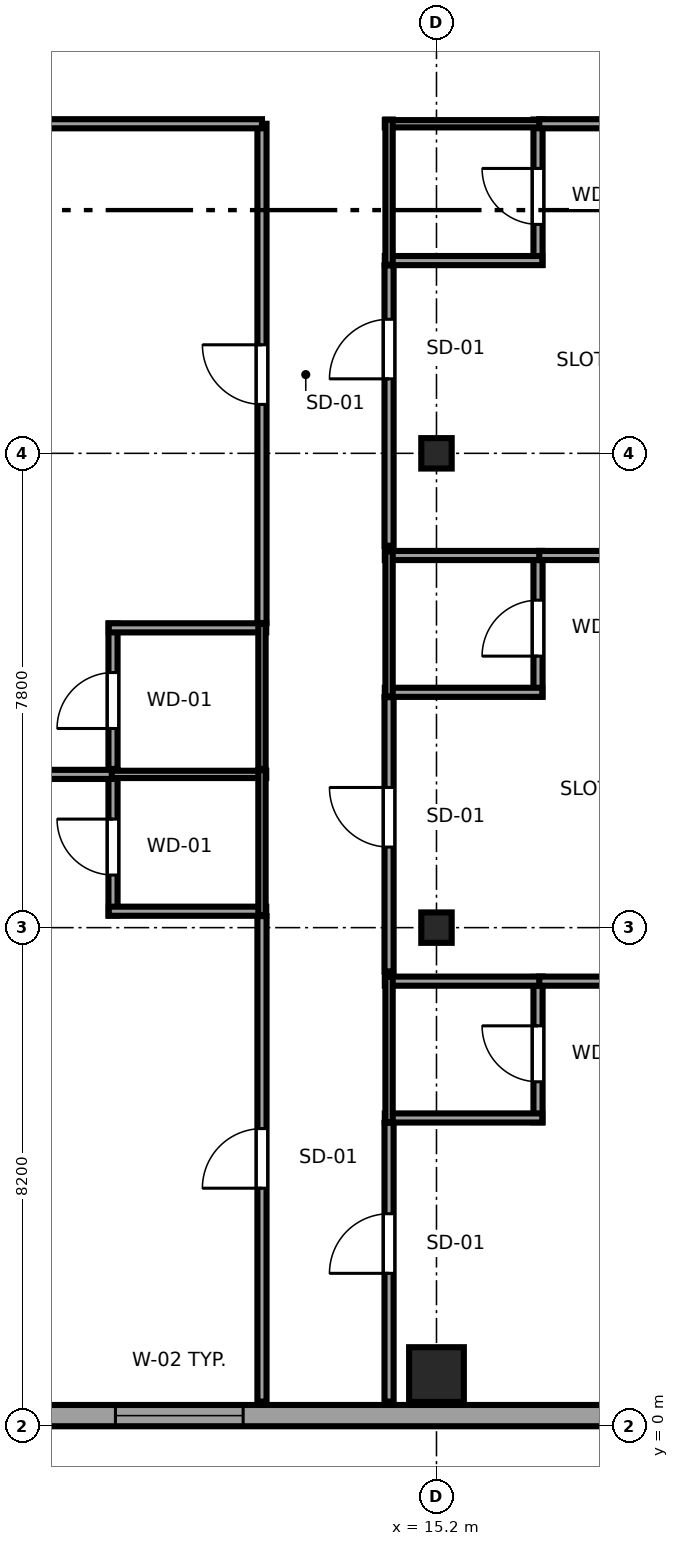
"""IFC4 building model, lengths in metres.
Left out: names, types, materials, properties, quantities, classifications, styles, units other than length and angle.
Written with IfcOpenShell. Run it as: python <this file> out.ifc"""

import sys

from ifc_helpers import new_model, si_unit, direction, frame, frame_2d, origin, origin_2d, place, context, subcontext, project, spatial, rectangle, i_section, extrude, source, transform, mapped, element, fill, save


model = new_model("IFC4")
c1 = context("Model", 3, precision=1e-05, world=origin(), true_north=direction((0.0, 1.0)))
c2 = subcontext(c1, "Body", "Model", "MODEL_VIEW")
j1 = project(units=[si_unit("LENGTHUNIT", "METRE"), si_unit("PLANEANGLEUNIT", "RADIAN")], contexts=[c1])
p1 = place(None, origin())
s1 = spatial("IfcSite", under=j1, at=p1, CompositionType="ELEMENT")
p2 = place(p1, origin())
s2 = spatial("IfcBuilding", under=s1, at=p2, CompositionType="ELEMENT")
p3 = place(p2, frame((0.0, 0.0, 139.95)))
s3 = spatial("IfcBuildingStorey", under=s2, at=p3, CompositionType="ELEMENT", Elevation=139.95)
m1 = source(origin(), c2, "Body", "SweptSolid", [
    extrude(rectangle(XDim=0.9, YDim=0.9, at=origin_2d()), origin(), (0.0, 0.0, 1.0), 3.55),
])
p4 = place(p3, frame((15.2, 0.85, 0.0), z_axis=(0.0, 0.0, 1.0), x_axis=(1.0, 0.0, 0.0)))
e1 = element("IfcColumn", 1, at=p4, inside=s3, PredefinedType="COLUMN", context=c2, shape_type="MappedRepresentation", body=[
    mapped(m1, transform((0.0, 0.0, 0.0), x_axis=(1.0, 0.0, 0.0), y_axis=(0.0, 1.0, 0.0), z_axis=(0.0, 0.0, 1.0), scale=1.0)),
])
m2 = source(origin(), c2, "Body", "SweptSolid", [
    extrude(i_section(OverallWidth=0.5, OverallDepth=0.5, WebThickness=0.022, FlangeThickness=0.034, at=origin_2d()), origin(), (0.0, 0.0, 1.0), 3.55),
])
for number, where, z_axis, x_axis in (
    (2, (15.2, 8.2, 0.0), (0.0, 0.0, 1.0), (1.0, 0.0, 0.0)),
    (3, (15.2, 16.0, 0.0), (0.0, 0.0, 1.0), (1.0, 0.0, 0.0)),
):
    element("IfcColumn", number, at=place(p3, frame(where, z_axis=z_axis, x_axis=x_axis)), inside=s3, PredefinedType="COLUMN", context=c2, shape_type="MappedRepresentation", body=[
        mapped(m2, transform((0.0, 0.0, 0.0), x_axis=(1.0, 0.0, 0.0), y_axis=(0.0, 1.0, 0.0), z_axis=(0.0, 0.0, 1.0), scale=1.0)),
    ])
p5 = place(p3, frame((4.617, 0.175, 0.0), z_axis=(0.0, 0.0, 1.0), x_axis=(1.0, 0.0, 0.0)))
e4 = element("IfcWall", 4, at=p5, inside=s3, PredefinedType="SOLIDWALL", context=c2, shape_type="SweptSolid", body=[
    extrude(rectangle(XDim=18.008, YDim=0.35, at=frame_2d((9.004, 0.0))), origin(), (0.0, 0.0, 1.0), 3.37),
])
p6 = place(p5, frame((5.303, 0.0, 0.68)))
e5 = element("IfcOpeningElement", 5, at=p6, cuts=e4, PredefinedType="OPENING", context=c2, shape_type="SweptSolid", body=[
    extrude(rectangle(XDim=2.1, YDim=1.9, at=frame_2d((1.05, 0.95))), frame((0.0, 0.185, 0.0), z_axis=(0.0, -1.0, 0.0), x_axis=(1.0, 0.0, 0.0)), (0.0, 0.0, 1.0), 0.37),
])
p7 = place(p5, frame((14.257, 0.0, 0.68)))
e6 = element("IfcOpeningElement", 6, at=p7, cuts=e4, PredefinedType="OPENING", context=c2, shape_type="SweptSolid", body=[
    extrude(rectangle(XDim=2.1, YDim=1.9, at=frame_2d((1.05, 0.95))), frame((0.0, 0.185, 0.0), z_axis=(0.0, -1.0, 0.0), x_axis=(1.0, 0.0, 0.0)), (0.0, 0.0, 1.0), 0.37),
])
p8 = place(p3, frame((9.88, 8.4, 0.0), z_axis=(0.0, 0.0, 1.0), x_axis=(0.0, 1.0, 0.0)))
e7 = element("IfcWall", 7, at=p8, inside=s3, PredefinedType="PARTITIONING", context=c2, shape_type="SweptSolid", body=[
    extrude(rectangle(XDim=2.39, YDim=0.15, at=frame_2d((1.195, 0.0))), origin(), (0.0, 0.0, 1.0), 3.37),
])
p9 = place(p8, frame((0.665, 0.0, 0.0)))
e8 = element("IfcOpeningElement", 8, at=p9, cuts=e7, PredefinedType="OPENING", context=c2, shape_type="SweptSolid", body=[
    extrude(rectangle(XDim=0.92, YDim=2.01, at=frame_2d((0.46, 1.005))), frame((0.0, 0.085, 0.0), z_axis=(0.0, -1.0, 0.0), x_axis=(1.0, 0.0, 0.0)), (0.0, 0.0, 1.0), 0.17),
])
p10 = place(p3, frame((9.81, 8.47, 0.0), z_axis=(0.0, 0.0, 1.0), x_axis=(1.0, 0.0, 0.0)))
e9 = element("IfcWall", 9, at=p10, inside=s3, PredefinedType="PARTITIONING", context=c2, shape_type="SweptSolid", body=[
    extrude(rectangle(XDim=2.59, YDim=0.15, at=frame_2d((1.295, 0.0))), origin(), (0.0, 0.0, 1.0), 3.37),
])
p11 = place(p3, frame((9.81, 10.72, 0.0), z_axis=(0.0, 0.0, 1.0), x_axis=(1.0, 0.0, 0.0)))
e10 = element("IfcWall", 10, at=p11, inside=s3, PredefinedType="PLUMBINGWALL", context=c2, shape_type="SweptSolid", body=[
    extrude(rectangle(XDim=2.59, YDim=0.12, at=frame_2d((1.295, 0.0))), origin(), (0.0, 0.0, 1.0), 3.37),
])
p12 = place(p3, frame((12.33, 8.4, 0.0), z_axis=(0.0, 0.0, 1.0), x_axis=(0.0, 1.0, 0.0)))
e11 = element("IfcWall", 11, at=p12, inside=s3, PredefinedType="PLUMBINGWALL", context=c2, shape_type="SweptSolid", body=[
    extrude(rectangle(XDim=2.39, YDim=0.12, at=frame_2d((1.195, 0.0))), origin(), (0.0, 0.0, 1.0), 3.37),
])
p13 = place(p3, frame((9.88, 10.81, 0.0), z_axis=(0.0, 0.0, 1.0), x_axis=(0.0, 1.0, 0.0)))
e12 = element("IfcWall", 12, at=p13, inside=s3, PredefinedType="PARTITIONING", context=c2, shape_type="SweptSolid", body=[
    extrude(rectangle(XDim=2.39, YDim=0.15, at=frame_2d((1.195, 0.0))), origin(), (0.0, 0.0, 1.0), 3.37),
])
p14 = place(p13, frame((0.665, 0.0, 0.0)))
e13 = element("IfcOpeningElement", 13, at=p14, cuts=e12, PredefinedType="OPENING", context=c2, shape_type="SweptSolid", body=[
    extrude(rectangle(XDim=0.92, YDim=2.01, at=frame_2d((0.46, 1.005))), frame((0.0, 0.085, 0.0), z_axis=(0.0, -1.0, 0.0), x_axis=(1.0, 0.0, 0.0)), (0.0, 0.0, 1.0), 0.17),
])
p15 = place(p3, frame((9.81, 13.13, 0.0), z_axis=(0.0, 0.0, 1.0), x_axis=(1.0, 0.0, 0.0)))
e14 = element("IfcWall", 14, at=p15, inside=s3, PredefinedType="PARTITIONING", context=c2, shape_type="SweptSolid", body=[
    extrude(rectangle(XDim=2.59, YDim=0.15, at=frame_2d((1.295, 0.0))), origin(), (0.0, 0.0, 1.0), 3.37),
])
p16 = place(p3, frame((12.33, 10.81, 0.0), z_axis=(0.0, 0.0, 1.0), x_axis=(0.0, 1.0, 0.0)))
e15 = element("IfcWall", 15, at=p16, inside=s3, PredefinedType="PLUMBINGWALL", context=c2, shape_type="SweptSolid", body=[
    extrude(rectangle(XDim=2.39, YDim=0.12, at=frame_2d((1.195, 0.0))), origin(), (0.0, 0.0, 1.0), 3.37),
])
p17 = place(p3, frame((16.87, 5.0, 0.0), z_axis=(0.0, 0.0, 1.0), x_axis=(0.0, 1.0, 0.0)))
e16 = element("IfcWall", 16, at=p17, inside=s3, PredefinedType="PARTITIONING", context=c2, shape_type="SweptSolid", body=[
    extrude(rectangle(XDim=2.39, YDim=0.15, at=frame_2d((1.195, 0.0))), origin(), (0.0, 0.0, 1.0), 3.37),
])
p18 = place(p17, frame((0.665, 0.0, 0.0)))
e17 = element("IfcOpeningElement", 17, at=p18, cuts=e16, PredefinedType="OPENING", context=c2, shape_type="SweptSolid", body=[
    extrude(rectangle(XDim=0.92, YDim=2.01, at=frame_2d((0.46, 1.005))), frame((0.0, 0.085, 0.0), z_axis=(0.0, -1.0, 0.0), x_axis=(1.0, 0.0, 0.0)), (0.0, 0.0, 1.0), 0.17),
])
for number, where, z_axis, x_axis in (
    (18, (14.35, 5.07, 0.0), (0.0, 0.0, 1.0), (1.0, 0.0, 0.0)),
    (19, (14.35, 7.32, 0.0), (0.0, 0.0, 1.0), (1.0, 0.0, 0.0)),
):
    element("IfcWall", number, at=place(p3, frame(where, z_axis=z_axis, x_axis=x_axis)), inside=s3, PredefinedType="PARTITIONING", context=c2, shape_type="SweptSolid", body=[
        extrude(rectangle(XDim=2.59, YDim=0.15, at=frame_2d((1.295, 0.0))), origin(), (0.0, 0.0, 1.0), 3.37),
    ])
p19 = place(p3, frame((14.42, 5.0, 0.0), z_axis=(0.0, 0.0, 1.0), x_axis=(0.0, 1.0, 0.0)))
e20 = element("IfcWall", 20, at=p19, inside=s3, PredefinedType="PLUMBINGWALL", context=c2, shape_type="SweptSolid", body=[
    extrude(rectangle(XDim=2.39, YDim=0.12, at=frame_2d((1.195, 0.0))), origin(), (0.0, 0.0, 1.0), 3.37),
])
p20 = place(p3, frame((16.87, 12.0, 0.0), z_axis=(0.0, 0.0, 1.0), x_axis=(0.0, 1.0, 0.0)))
e21 = element("IfcWall", 21, at=p20, inside=s3, PredefinedType="PARTITIONING", context=c2, shape_type="SweptSolid", body=[
    extrude(rectangle(XDim=2.39, YDim=0.15, at=frame_2d((1.195, 0.0))), origin(), (0.0, 0.0, 1.0), 3.37),
])
p21 = place(p20, frame((0.665, 0.0, 0.0)))
e22 = element("IfcOpeningElement", 22, at=p21, cuts=e21, PredefinedType="OPENING", context=c2, shape_type="SweptSolid", body=[
    extrude(rectangle(XDim=0.92, YDim=2.01, at=frame_2d((0.46, 1.005))), frame((0.0, 0.085, 0.0), z_axis=(0.0, -1.0, 0.0), x_axis=(1.0, 0.0, 0.0)), (0.0, 0.0, 1.0), 0.17),
])
for number, where, z_axis, x_axis in (
    (23, (14.35, 12.07, 0.0), (0.0, 0.0, 1.0), (1.0, 0.0, 0.0)),
    (24, (14.35, 14.32, 0.0), (0.0, 0.0, 1.0), (1.0, 0.0, 0.0)),
):
    element("IfcWall", number, at=place(p3, frame(where, z_axis=z_axis, x_axis=x_axis)), inside=s3, PredefinedType="PARTITIONING", context=c2, shape_type="SweptSolid", body=[
        extrude(rectangle(XDim=2.59, YDim=0.15, at=frame_2d((1.295, 0.0))), origin(), (0.0, 0.0, 1.0), 3.37),
    ])
p22 = place(p3, frame((14.42, 12.0, 0.0), z_axis=(0.0, 0.0, 1.0), x_axis=(0.0, 1.0, 0.0)))
e25 = element("IfcWall", 25, at=p22, inside=s3, PredefinedType="PLUMBINGWALL", context=c2, shape_type="SweptSolid", body=[
    extrude(rectangle(XDim=2.39, YDim=0.12, at=frame_2d((1.195, 0.0))), origin(), (0.0, 0.0, 1.0), 3.37),
])
p23 = place(p3, frame((16.87, 19.1, 0.0), z_axis=(0.0, 0.0, 1.0), x_axis=(0.0, 1.0, 0.0)))
e26 = element("IfcWall", 26, at=p23, inside=s3, PredefinedType="PARTITIONING", context=c2, shape_type="SweptSolid", body=[
    extrude(rectangle(XDim=2.39, YDim=0.15, at=frame_2d((1.195, 0.0))), origin(), (0.0, 0.0, 1.0), 3.37),
])
p24 = place(p23, frame((0.665, 0.0, 0.0)))
e27 = element("IfcOpeningElement", 27, at=p24, cuts=e26, PredefinedType="OPENING", context=c2, shape_type="SweptSolid", body=[
    extrude(rectangle(XDim=0.92, YDim=2.01, at=frame_2d((0.46, 1.005))), frame((0.0, 0.085, 0.0), z_axis=(0.0, -1.0, 0.0), x_axis=(1.0, 0.0, 0.0)), (0.0, 0.0, 1.0), 0.17),
])
p25 = place(p3, frame((14.35, 19.17, 0.0), z_axis=(0.0, 0.0, 1.0), x_axis=(1.0, 0.0, 0.0)))
e28 = element("IfcWall", 28, at=p25, inside=s3, PredefinedType="PARTITIONING", context=c2, shape_type="SweptSolid", body=[
    extrude(rectangle(XDim=2.59, YDim=0.15, at=frame_2d((1.295, 0.0))), origin(), (0.0, 0.0, 1.0), 3.37),
])
p26 = place(p3, frame((14.35, 21.42, 0.0), z_axis=(0.0, 0.0, 1.0), x_axis=(1.0, 0.0, 0.0)))
e29 = element("IfcWall", 29, at=p26, inside=s3, PredefinedType="PLUMBINGWALL", context=c2, shape_type="SweptSolid", body=[
    extrude(rectangle(XDim=2.59, YDim=0.12, at=frame_2d((1.295, 0.0))), origin(), (0.0, 0.0, 1.0), 3.37),
])
p27 = place(p3, frame((14.42, 19.1, 0.0), z_axis=(0.0, 0.0, 1.0), x_axis=(0.0, 1.0, 0.0)))
e30 = element("IfcWall", 30, at=p27, inside=s3, PredefinedType="PLUMBINGWALL", context=c2, shape_type="SweptSolid", body=[
    extrude(rectangle(XDim=2.39, YDim=0.12, at=frame_2d((1.195, 0.0))), origin(), (0.0, 0.0, 1.0), 3.37),
])
p28 = place(p3, frame((12.33, 0.405, 0.0), z_axis=(0.0, 0.0, 1.0), x_axis=(0.0, 1.0, 0.0)))
e31 = element("IfcWall", 31, at=p28, inside=s3, PredefinedType="PARTITIONING", context=c2, shape_type="SweptSolid", body=[
    extrude(rectangle(XDim=7.985, YDim=0.15, at=frame_2d((3.992, 0.0))), origin(), (0.0, 0.0, 1.0), 3.37),
])
p29 = place(p28, frame((3.51, 0.0, 0.0)))
e32 = element("IfcOpeningElement", 32, at=p29, cuts=e31, PredefinedType="OPENING", context=c2, shape_type="SweptSolid", body=[
    extrude(rectangle(XDim=0.98, YDim=2.12, at=frame_2d((0.49, 1.06))), frame((0.0, 0.085, 0.0), z_axis=(0.0, -1.0, 0.0), x_axis=(1.0, 0.0, 0.0)), (0.0, 0.0, 1.0), 0.17),
])
p30 = place(p3, frame((0.405, 10.72, 0.0), z_axis=(0.0, 0.0, 1.0), x_axis=(1.0, 0.0, 0.0)))
e33 = element("IfcWall", 33, at=p30, inside=s3, PredefinedType="PARTITIONING", context=c2, shape_type="SweptSolid", body=[
    extrude(rectangle(XDim=9.455, YDim=0.15, at=frame_2d((4.728, 0.0))), origin(), (0.0, 0.0, 1.0), 3.37),
])
p31 = place(p3, frame((12.33, 13.21, 0.0), z_axis=(0.0, 0.0, 1.0), x_axis=(0.0, 1.0, 0.0)))
e34 = element("IfcWall", 34, at=p31, inside=s3, PredefinedType="PARTITIONING", context=c2, shape_type="SweptSolid", body=[
    extrude(rectangle(XDim=8.21, YDim=0.15, at=frame_2d((4.105, 0.0))), origin(), (0.0, 0.0, 1.0), 3.37),
])
p32 = place(p31, frame((3.595, 0.0, 0.0)))
e35 = element("IfcOpeningElement", 35, at=p32, cuts=e34, PredefinedType="OPENING", context=c2, shape_type="SweptSolid", body=[
    extrude(rectangle(XDim=0.98, YDim=2.12, at=frame_2d((0.49, 1.06))), frame((0.0, 0.085, 0.0), z_axis=(0.0, -1.0, 0.0), x_axis=(1.0, 0.0, 0.0)), (0.0, 0.0, 1.0), 0.17),
])
p33 = place(p3, frame((0.405, 21.42, 0.0), z_axis=(0.0, 0.0, 1.0), x_axis=(1.0, 0.0, 0.0)))
e36 = element("IfcWall", 36, at=p33, inside=s3, PredefinedType="PARTITIONING", context=c2, shape_type="SweptSolid", body=[
    extrude(rectangle(XDim=11.925, YDim=0.15, at=frame_2d((5.962, 0.0))), origin(), (0.0, 0.0, 1.0), 3.37),
])
p34 = place(p3, frame((14.42, 0.405, 0.0), z_axis=(0.0, 0.0, 1.0), x_axis=(0.0, 1.0, 0.0)))
e37 = element("IfcWall", 37, at=p34, inside=s3, PredefinedType="PARTITIONING", context=c2, shape_type="SweptSolid", body=[
    extrude(rectangle(XDim=4.585, YDim=0.15, at=frame_2d((2.292, 0.0))), origin(), (0.0, 0.0, 1.0), 3.37),
])
p35 = place(p34, frame((2.11, 0.0, 0.0)))
e38 = element("IfcOpeningElement", 38, at=p35, cuts=e37, PredefinedType="OPENING", context=c2, shape_type="SweptSolid", body=[
    extrude(rectangle(XDim=0.98, YDim=2.12, at=frame_2d((0.49, 1.06))), frame((0.0, 0.085, 0.0), z_axis=(0.0, -1.0, 0.0), x_axis=(1.0, 0.0, 0.0)), (0.0, 0.0, 1.0), 0.17),
])
p36 = place(p3, frame((16.89, 7.32, 0.0), z_axis=(0.0, 0.0, 1.0), x_axis=(1.0, 0.0, 0.0)))
e39 = element("IfcWall", 39, at=p36, inside=s3, PredefinedType="PARTITIONING", context=c2, shape_type="SweptSolid", body=[
    extrude(rectangle(XDim=5.46, YDim=0.15, at=frame_2d((2.73, 0.0))), origin(), (0.0, 0.0, 1.0), 3.37),
])
p37 = place(p3, frame((14.42, 7.48, 0.0), z_axis=(0.0, 0.0, 1.0), x_axis=(0.0, 1.0, 0.0)))
e40 = element("IfcWall", 40, at=p37, inside=s3, PredefinedType="PARTITIONING", context=c2, shape_type="SweptSolid", body=[
    extrude(rectangle(XDim=4.51, YDim=0.15, at=frame_2d((2.255, 0.0))), origin(), (0.0, 0.0, 1.0), 3.37),
])
p38 = place(p37, frame((2.045, 0.0, 0.0)))
e41 = element("IfcOpeningElement", 41, at=p38, cuts=e40, PredefinedType="OPENING", context=c2, shape_type="SweptSolid", body=[
    extrude(rectangle(XDim=0.98, YDim=2.12, at=frame_2d((0.49, 1.06))), frame((0.0, 0.085, 0.0), z_axis=(0.0, -1.0, 0.0), x_axis=(1.0, 0.0, 0.0)), (0.0, 0.0, 1.0), 0.17),
])
p39 = place(p3, frame((16.89, 14.32, 0.0), z_axis=(0.0, 0.0, 1.0), x_axis=(1.0, 0.0, 0.0)))
e42 = element("IfcWall", 42, at=p39, inside=s3, PredefinedType="PARTITIONING", context=c2, shape_type="SweptSolid", body=[
    extrude(rectangle(XDim=5.46, YDim=0.15, at=frame_2d((2.73, 0.0))), origin(), (0.0, 0.0, 1.0), 3.37),
])
p40 = place(p3, frame((14.42, 14.48, 0.0), z_axis=(0.0, 0.0, 1.0), x_axis=(0.0, 1.0, 0.0)))
e43 = element("IfcWall", 43, at=p40, inside=s3, PredefinedType="PARTITIONING", context=c2, shape_type="SweptSolid", body=[
    extrude(rectangle(XDim=4.61, YDim=0.15, at=frame_2d((2.305, 0.0))), origin(), (0.0, 0.0, 1.0), 3.37),
])
p41 = place(p40, frame((2.745, 0.0, 0.0)))
e44 = element("IfcOpeningElement", 44, at=p41, cuts=e43, PredefinedType="OPENING", context=c2, shape_type="SweptSolid", body=[
    extrude(rectangle(XDim=0.98, YDim=2.12, at=frame_2d((0.49, 1.06))), frame((0.0, 0.085, 0.0), z_axis=(0.0, -1.0, 0.0), x_axis=(1.0, 0.0, 0.0)), (0.0, 0.0, 1.0), 0.17),
])
p42 = place(p3, frame((16.89, 21.42, 0.0), z_axis=(0.0, 0.0, 1.0), x_axis=(1.0, 0.0, 0.0)))
e45 = element("IfcWall", 45, at=p42, inside=s3, PredefinedType="PARTITIONING", context=c2, shape_type="SweptSolid", body=[
    extrude(rectangle(XDim=5.46, YDim=0.15, at=frame_2d((2.73, 0.0))), origin(), (0.0, 0.0, 1.0), 3.37),
])
m3 = source(origin(), c2, "Body", "SweptSolid", [
    extrude(rectangle(XDim=2.1, YDim=1.9, at=frame_2d((1.05, 0.95))), frame((0.0, 0.09, 0.0), z_axis=(0.0, -1.0, 0.0), x_axis=(1.0, 0.0, 0.0)), (0.0, 0.0, 1.0), 0.06),
])
p43 = place(p6, origin())
e46 = element("IfcWindow", 46, at=p43, inside=s3, PartitioningType="TRIPLE_PANEL_HORIZONTAL", PredefinedType="WINDOW", context=c2, shape_type="MappedRepresentation", body=[
    mapped(m3, transform((0.0, 0.0, 0.0), x_axis=(1.0, 0.0, 0.0), y_axis=(0.0, 1.0, 0.0), z_axis=(0.0, 0.0, 1.0), scale=1.0)),
])
fill(e5, e46)
m4 = source(origin(), c2, "Body", "SweptSolid", [
    extrude(rectangle(XDim=0.92, YDim=2.01, at=frame_2d((0.46, 1.005))), frame((0.0, 0.025, 0.0), z_axis=(0.0, -1.0, 0.0), x_axis=(1.0, 0.0, 0.0)), (0.0, 0.0, 1.0), 0.05),
])
p44 = place(p9, origin())
e47 = element("IfcDoor", 47, at=p44, inside=s3, OperationType="SINGLE_SWING_RIGHT", PredefinedType="DOOR", context=c2, shape_type="MappedRepresentation", body=[
    mapped(m4, transform((0.0, 0.0, 0.0), x_axis=(1.0, 0.0, 0.0), y_axis=(0.0, 1.0, 0.0), z_axis=(0.0, 0.0, 1.0), scale=1.0)),
])
fill(e8, e47)
p45 = place(p14, origin())
e48 = element("IfcDoor", 48, at=p45, inside=s3, OperationType="SINGLE_SWING_LEFT", PredefinedType="DOOR", context=c2, shape_type="MappedRepresentation", body=[
    mapped(m4, transform((0.0, 0.0, 0.0), x_axis=(1.0, 0.0, 0.0), y_axis=(0.0, 1.0, 0.0), z_axis=(0.0, 0.0, 1.0), scale=1.0)),
])
fill(e13, e48)
p46 = place(p18, origin())
e49 = element("IfcDoor", 49, at=p46, inside=s3, OperationType="SINGLE_SWING_RIGHT", PredefinedType="DOOR", context=c2, shape_type="MappedRepresentation", body=[
    mapped(m4, transform((0.0, 0.0, 0.0), x_axis=(1.0, 0.0, 0.0), y_axis=(0.0, 1.0, 0.0), z_axis=(0.0, 0.0, 1.0), scale=1.0)),
])
fill(e17, e49)
p47 = place(p21, origin())
e50 = element("IfcDoor", 50, at=p47, inside=s3, OperationType="SINGLE_SWING_LEFT", PredefinedType="DOOR", context=c2, shape_type="MappedRepresentation", body=[
    mapped(m4, transform((0.0, 0.0, 0.0), x_axis=(1.0, 0.0, 0.0), y_axis=(0.0, 1.0, 0.0), z_axis=(0.0, 0.0, 1.0), scale=1.0)),
])
fill(e22, e50)
p48 = place(p24, origin())
e51 = element("IfcDoor", 51, at=p48, inside=s3, OperationType="SINGLE_SWING_RIGHT", PredefinedType="DOOR", context=c2, shape_type="MappedRepresentation", body=[
    mapped(m4, transform((0.0, 0.0, 0.0), x_axis=(1.0, 0.0, 0.0), y_axis=(0.0, 1.0, 0.0), z_axis=(0.0, 0.0, 1.0), scale=1.0)),
])
fill(e27, e51)
m5 = source(origin(), c2, "Body", "SweptSolid", [
    extrude(rectangle(XDim=0.98, YDim=2.12, at=frame_2d((0.49, 1.06))), frame((0.0, 0.025, 0.0), z_axis=(0.0, -1.0, 0.0), x_axis=(1.0, 0.0, 0.0)), (0.0, 0.0, 1.0), 0.05),
])
p49 = place(p29, origin())
e52 = element("IfcDoor", 52, at=p49, inside=s3, OperationType="SINGLE_SWING_LEFT", PredefinedType="DOOR", context=c2, shape_type="MappedRepresentation", body=[
    mapped(m5, transform((0.0, 0.0, 0.0), x_axis=(1.0, 0.0, 0.0), y_axis=(0.0, 1.0, 0.0), z_axis=(0.0, 0.0, 1.0), scale=1.0)),
])
fill(e32, e52)
p50 = place(p32, origin())
e53 = element("IfcDoor", 53, at=p50, inside=s3, OperationType="SINGLE_SWING_RIGHT", PredefinedType="DOOR", context=c2, shape_type="MappedRepresentation", body=[
    mapped(m5, transform((0.0, 0.0, 0.0), x_axis=(1.0, 0.0, 0.0), y_axis=(0.0, 1.0, 0.0), z_axis=(0.0, 0.0, 1.0), scale=1.0)),
])
fill(e35, e53)
p51 = place(p35, origin())
e54 = element("IfcDoor", 54, at=p51, inside=s3, OperationType="SINGLE_SWING_LEFT", PredefinedType="DOOR", context=c2, shape_type="MappedRepresentation", body=[
    mapped(m5, transform((0.0, 0.0, 0.0), x_axis=(1.0, 0.0, 0.0), y_axis=(0.0, 1.0, 0.0), z_axis=(0.0, 0.0, 1.0), scale=1.0)),
])
fill(e38, e54)
p52 = place(p38, origin())
e55 = element("IfcDoor", 55, at=p52, inside=s3, OperationType="SINGLE_SWING_RIGHT", PredefinedType="DOOR", context=c2, shape_type="MappedRepresentation", body=[
    mapped(m5, transform((0.0, 0.0, 0.0), x_axis=(1.0, 0.0, 0.0), y_axis=(0.0, 1.0, 0.0), z_axis=(0.0, 0.0, 1.0), scale=1.0)),
])
fill(e41, e55)
p53 = place(p41, origin())
e56 = element("IfcDoor", 56, at=p53, inside=s3, OperationType="SINGLE_SWING_LEFT", PredefinedType="DOOR", context=c2, shape_type="MappedRepresentation", body=[
    mapped(m5, transform((0.0, 0.0, 0.0), x_axis=(1.0, 0.0, 0.0), y_axis=(0.0, 1.0, 0.0), z_axis=(0.0, 0.0, 1.0), scale=1.0)),
])
fill(e44, e56)
save(model, sys.argv[1])
